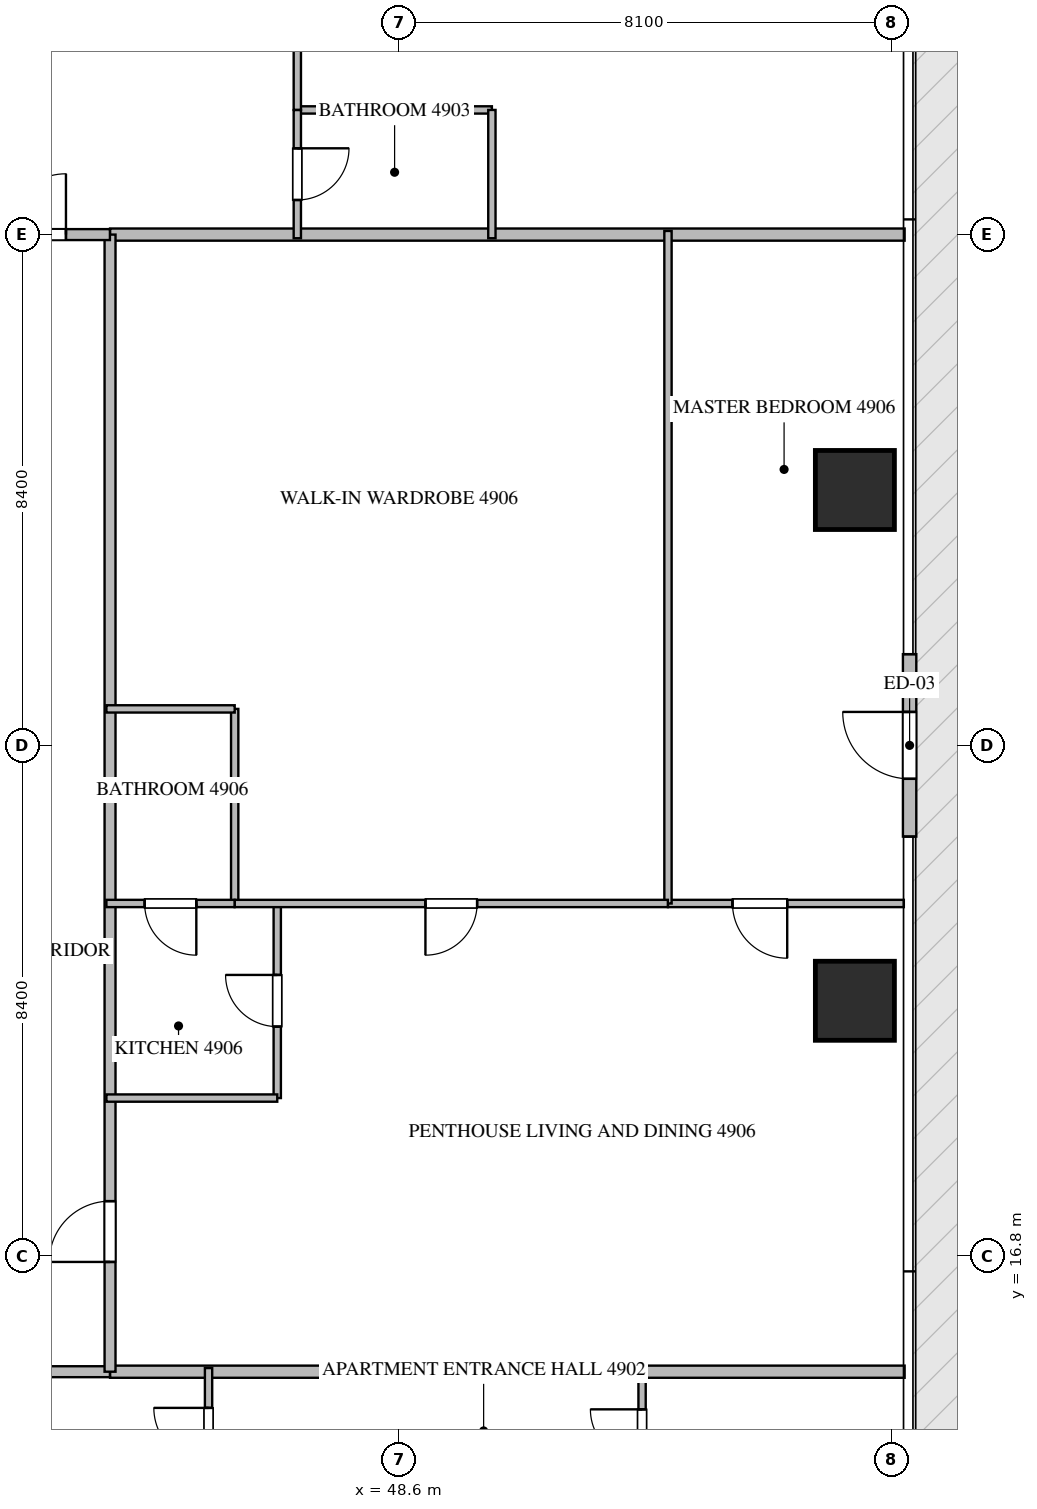
"""IFC4 building model, lengths in metres.
Left out: names, types, materials, properties, quantities, classifications, styles, units other than length and angle.
Written with IfcOpenShell. Run it as: python <this file> out.ifc"""

import sys

from ifc_helpers import new_model, si_unit, direction, frame, frame_2d, origin, origin_2d, place, context, subcontext, project, spatial, rectangle, extrude, source, transform, mapped, element, fill, save


model = new_model("IFC4")
c1 = context("Model", 3, precision=1e-05, world=origin(), true_north=direction((0.0, 1.0)))
c2 = subcontext(c1, "Body", "Model", "MODEL_VIEW")
j1 = project(units=[si_unit("LENGTHUNIT", "METRE"), si_unit("PLANEANGLEUNIT", "RADIAN")], contexts=[c1])
p1 = place(None, origin())
s1 = spatial("IfcSite", under=j1, at=p1, CompositionType="ELEMENT")
p2 = place(p1, origin())
s2 = spatial("IfcBuilding", under=s1, at=p2, CompositionType="ELEMENT")
p3 = place(p2, frame((0.0, 0.0, 195.15)))
s3 = spatial("IfcBuildingStorey", under=s2, at=p3, CompositionType="ELEMENT", Elevation=195.15)
m1 = source(origin(), c2, "Body", "SweptSolid", [
    extrude(rectangle(XDim=1.3, YDim=1.3, at=origin_2d()), origin(), (0.0, 0.0, 1.0), 3.57),
])
for number, where, z_axis, x_axis in (
    (1, (56.1, 21.0, -0.26), (0.0, 0.0, 1.0), (1.0, 0.0, 0.0)),
    (2, (56.1, 29.4, -0.26), (0.0, 0.0, 1.0), (1.0, 0.0, 0.0)),
):
    element("IfcColumn", number, at=place(p3, frame(where, z_axis=z_axis, x_axis=x_axis)), inside=s3, PredefinedType="COLUMN", context=c2, shape_type="MappedRepresentation", body=[
        mapped(m1, transform((0.0, 0.0, 0.0), scale=1.0)),
    ])
p4 = place(p3, frame((57.0, 23.7, 0.0), z_axis=(0.0, 0.0, 1.0), x_axis=(0.0, 1.0, 0.0)))
e3 = element("IfcWall", 3, at=p4, inside=s3, PredefinedType="ELEMENTEDWALL", context=c2, shape_type="SweptSolid", body=[
    extrude(rectangle(XDim=3.0, YDim=0.22, at=frame_2d((1.5, 0.0))), origin(), (0.0, 0.0, 1.0), 3.295),
])
p5 = place(p4, frame((0.95, 0.0, 0.0)))
e4 = element("IfcOpeningElement", 4, at=p5, cuts=e3, PredefinedType="OPENING", context=c2, shape_type="SweptSolid", body=[
    extrude(rectangle(XDim=1.1, YDim=2.2, at=frame_2d((0.55, 1.1))), frame((0.0, 0.12, 0.0), z_axis=(0.0, -1.0, 0.0), x_axis=(1.0, 0.0, 0.0)), (0.0, 0.0, 1.0), 0.24),
])
for number, where, z_axis, x_axis in (
    (5, (43.85, 14.9, 0.0), (0.0, 0.0, 1.0), (1.0, 0.0, 0.0)),
    (6, (43.85, 33.6, 0.0), (0.0, 0.0, 1.0), (1.0, 0.0, 0.0)),
):
    element("IfcWall", number, at=place(p3, frame(where, z_axis=z_axis, x_axis=x_axis)), inside=s3, PredefinedType="PARTITIONING", context=c2, shape_type="SweptSolid", body=[
        extrude(rectangle(XDim=13.068, YDim=0.2, at=frame_2d((6.534, 0.0))), origin(), (0.0, 0.0, 1.0), 3.31),
    ])
p6 = place(p3, frame((20.952, 14.9, 0.0), z_axis=(0.0, 0.0, 1.0), x_axis=(1.0, 0.0, 0.0)))
e7 = element("IfcWall", 7, at=p6, inside=s3, PredefinedType="PARTITIONING", context=c2, shape_type="SweptSolid", body=[
    extrude(rectangle(XDim=22.896, YDim=0.18, at=frame_2d((11.448, 0.0))), origin(), (0.0, 0.0, 1.0), 2.145),
])
p7 = place(p6, frame((14.231, 0.0, 0.0)))
e8 = element("IfcOpeningElement", 8, at=p7, cuts=e7, PredefinedType="OPENING", context=c2, shape_type="SweptSolid", body=[
    extrude(rectangle(XDim=0.9, YDim=2.1, at=frame_2d((0.45, 1.05))), frame((0.0, 0.1, 0.0), z_axis=(0.0, -1.0, 0.0), x_axis=(1.0, 0.0, 0.0)), (0.0, 0.0, 1.0), 0.2),
])
p8 = place(p6, frame((19.203, 0.0, 0.0)))
e9 = element("IfcOpeningElement", 9, at=p8, cuts=e7, PredefinedType="OPENING", context=c2, shape_type="SweptSolid", body=[
    extrude(rectangle(XDim=0.9, YDim=2.1, at=frame_2d((0.45, 1.05))), frame((0.0, 0.1, 0.0), z_axis=(0.0, -1.0, 0.0), x_axis=(1.0, 0.0, 0.0)), (0.0, 0.0, 1.0), 0.2),
])
p9 = place(p3, frame((43.85, 14.9, 0.0), z_axis=(0.0, 0.0, 1.0), x_axis=(0.0, 1.0, 0.0)))
e10 = element("IfcWall", 10, at=p9, inside=s3, PredefinedType="PARTITIONING", context=c2, shape_type="SweptSolid", body=[
    extrude(rectangle(XDim=18.7, YDim=0.18, at=frame_2d((9.35, 0.0))), origin(), (0.0, 0.0, 1.0), 3.31),
])
p10 = place(p9, frame((1.805, 0.0, 0.0)))
e11 = element("IfcOpeningElement", 11, at=p10, cuts=e10, PredefinedType="OPENING", context=c2, shape_type="SweptSolid", body=[
    extrude(rectangle(XDim=1.0, YDim=2.15, at=frame_2d((0.5, 1.075))), frame((0.0, 0.1, 0.0), z_axis=(0.0, -1.0, 0.0), x_axis=(1.0, 0.0, 0.0)), (0.0, 0.0, 1.0), 0.2),
])
p11 = place(p3, frame((41.402, 33.6, 0.0), z_axis=(0.0, 0.0, 1.0), x_axis=(1.0, 0.0, 0.0)))
e12 = element("IfcWall", 12, at=p11, inside=s3, PredefinedType="PARTITIONING", context=c2, shape_type="SweptSolid", body=[
    extrude(rectangle(XDim=2.446, YDim=0.18, at=frame_2d((1.223, 0.0))), origin(), (0.0, 0.0, 1.0), 3.31),
])
p12 = place(p11, frame((0.723, 0.0, 0.0)))
e13 = element("IfcOpeningElement", 13, at=p12, cuts=e12, PredefinedType="OPENING", context=c2, shape_type="SweptSolid", body=[
    extrude(rectangle(XDim=1.0, YDim=2.15, at=frame_2d((0.5, 1.075))), frame((0.0, 0.1, 0.0), z_axis=(0.0, -1.0, 0.0), x_axis=(1.0, 0.0, 0.0)), (0.0, 0.0, 1.0), 0.2),
])
p13 = place(p3, frame((45.47, 12.75, 0.0), z_axis=(0.0, 0.0, 1.0), x_axis=(0.0, 1.0, 0.0)))
e14 = element("IfcWall", 14, at=p13, inside=s3, PredefinedType="PARTITIONING", context=c2, shape_type="SweptSolid", body=[
    extrude(rectangle(XDim=2.21, YDim=0.12, at=frame_2d((1.105, 0.0))), origin(), (0.0, 0.0, 1.0), 3.31),
])
p14 = place(p13, frame((0.655, 0.0, 0.0)))
e15 = element("IfcOpeningElement", 15, at=p14, cuts=e14, PredefinedType="OPENING", context=c2, shape_type="SweptSolid", body=[
    extrude(rectangle(XDim=0.9, YDim=2.1, at=frame_2d((0.45, 1.05))), frame((0.0, 0.07, 0.0), z_axis=(0.0, -1.0, 0.0), x_axis=(1.0, 0.0, 0.0)), (0.0, 0.0, 1.0), 0.14),
])
p15 = place(p3, frame((52.6, 12.752, 0.0), z_axis=(0.0, 0.0, 1.0), x_axis=(0.0, 1.0, 0.0)))
e16 = element("IfcWall", 16, at=p15, inside=s3, PredefinedType="PARTITIONING", context=c2, shape_type="SweptSolid", body=[
    extrude(rectangle(XDim=2.208, YDim=0.12, at=frame_2d((1.104, 0.0))), origin(), (0.0, 0.0, 1.0), 3.31),
])
p16 = place(p15, frame((0.679, 0.0, 0.0)))
e17 = element("IfcOpeningElement", 17, at=p16, cuts=e16, PredefinedType="OPENING", context=c2, shape_type="SweptSolid", body=[
    extrude(rectangle(XDim=0.85, YDim=2.1, at=frame_2d((0.425, 1.05))), frame((0.0, 0.07, 0.0), z_axis=(0.0, -1.0, 0.0), x_axis=(1.0, 0.0, 0.0)), (0.0, 0.0, 1.0), 0.14),
])
p17 = place(p3, frame((46.93, 35.65, 0.0), z_axis=(0.0, 0.0, 1.0), x_axis=(1.0, 0.0, 0.0)))
e18 = element("IfcWall", 18, at=p17, inside=s3, PredefinedType="PARTITIONING", context=c2, shape_type="SweptSolid", body=[
    extrude(rectangle(XDim=3.2, YDim=0.12, at=frame_2d((1.6, 0.0))), origin(), (0.0, 0.0, 1.0), 3.31),
])
p18 = place(p3, frame((50.13, 35.65, 0.0), z_axis=(0.0, 0.0, 1.0), x_axis=(0.0, -1.0, 0.0)))
e19 = element("IfcWall", 19, at=p18, inside=s3, PredefinedType="PARTITIONING", context=c2, shape_type="SweptSolid", body=[
    extrude(rectangle(XDim=2.11, YDim=0.12, at=frame_2d((1.055, 0.0))), origin(), (0.0, 0.0, 1.0), 3.31),
])
p19 = place(p3, frame((46.93, 41.073, 0.0), z_axis=(0.0, 0.0, 1.0), x_axis=(0.0, -1.0, 0.0)))
e20 = element("IfcWall", 20, at=p19, inside=s3, PredefinedType="PARTITIONING", context=c2, shape_type="SweptSolid", body=[
    extrude(rectangle(XDim=5.423, YDim=0.12, at=frame_2d((2.711, 0.0))), origin(), (0.0, 0.0, 1.0), 3.31),
])
p20 = place(p19, frame((2.287, 0.0, 0.0)))
e21 = element("IfcOpeningElement", 21, at=p20, cuts=e20, PredefinedType="OPENING", context=c2, shape_type="SweptSolid", body=[
    extrude(rectangle(XDim=0.85, YDim=2.1, at=frame_2d((0.425, 1.05))), frame((0.0, 0.07, 0.0), z_axis=(0.0, -1.0, 0.0), x_axis=(1.0, 0.0, 0.0)), (0.0, 0.0, 1.0), 0.14),
])
p21 = place(p3, frame((46.93, 35.648, 0.0), z_axis=(0.0, 0.0, 1.0), x_axis=(0.0, -1.0, 0.0)))
e22 = element("IfcWall", 22, at=p21, inside=s3, PredefinedType="PARTITIONING", context=c2, shape_type="SweptSolid", body=[
    extrude(rectangle(XDim=2.108, YDim=0.12, at=frame_2d((1.054, 0.0))), origin(), (0.0, 0.0, 1.0), 3.31),
])
p22 = place(p21, frame((0.629, 0.0, 0.0)))
e23 = element("IfcOpeningElement", 23, at=p22, cuts=e22, PredefinedType="OPENING", context=c2, shape_type="SweptSolid", body=[
    extrude(rectangle(XDim=0.85, YDim=2.1, at=frame_2d((0.425, 1.05))), frame((0.0, 0.07, 0.0), z_axis=(0.0, -1.0, 0.0), x_axis=(1.0, 0.0, 0.0)), (0.0, 0.0, 1.0), 0.14),
])
p23 = place(p3, frame((46.6, 19.4, 0.0), z_axis=(0.0, 0.0, 1.0), x_axis=(0.0, 1.0, 0.0)))
e24 = element("IfcWall", 24, at=p23, inside=s3, PredefinedType="PARTITIONING", context=c2, shape_type="SweptSolid", body=[
    extrude(rectangle(XDim=3.2, YDim=0.12, at=frame_2d((1.6, 0.0))), origin(), (0.0, 0.0, 1.0), 3.31),
])
p24 = place(p23, frame((1.175, 0.0, 0.0)))
e25 = element("IfcOpeningElement", 25, at=p24, cuts=e24, PredefinedType="OPENING", context=c2, shape_type="SweptSolid", body=[
    extrude(rectangle(XDim=0.85, YDim=2.1, at=frame_2d((0.425, 1.05))), frame((0.0, 0.07, 0.0), z_axis=(0.0, -1.0, 0.0), x_axis=(1.0, 0.0, 0.0)), (0.0, 0.0, 1.0), 0.14),
])
p25 = place(p3, frame((46.6, 19.4, 0.0), z_axis=(0.0, 0.0, 1.0), x_axis=(-1.0, 0.0, 0.0)))
e26 = element("IfcWall", 26, at=p25, inside=s3, PredefinedType="PARTITIONING", context=c2, shape_type="SweptSolid", body=[
    extrude(rectangle(XDim=2.81, YDim=0.12, at=frame_2d((1.405, 0.0))), origin(), (0.0, 0.0, 1.0), 3.31),
])
p26 = place(p3, frame((56.905, 22.6, 0.0), z_axis=(0.0, 0.0, 1.0), x_axis=(-1.0, 0.0, 0.0)))
e27 = element("IfcWall", 27, at=p26, inside=s3, PredefinedType="PARTITIONING", context=c2, shape_type="SweptSolid", body=[
    extrude(rectangle(XDim=3.879, YDim=0.12, at=frame_2d((1.939, 0.0))), origin(), (0.0, 0.0, 1.0), 3.31),
])
p27 = place(p26, frame((1.918, 0.0, 0.0)))
e28 = element("IfcOpeningElement", 28, at=p27, cuts=e27, PredefinedType="OPENING", context=c2, shape_type="SweptSolid", body=[
    extrude(rectangle(XDim=0.9, YDim=2.1, at=frame_2d((0.45, 1.05))), frame((0.0, 0.07, 0.0), z_axis=(0.0, -1.0, 0.0), x_axis=(1.0, 0.0, 0.0)), (0.0, 0.0, 1.0), 0.14),
])
p28 = place(p3, frame((53.026, 22.6, 0.0), z_axis=(0.0, 0.0, 1.0), x_axis=(0.0, 1.0, 0.0)))
e29 = element("IfcWall", 29, at=p28, inside=s3, PredefinedType="PARTITIONING", context=c2, shape_type="SweptSolid", body=[
    extrude(rectangle(XDim=11.06, YDim=0.12, at=frame_2d((5.53, 0.0))), origin(), (0.0, 0.0, 1.0), 3.31),
])
p29 = place(p3, frame((45.9, 22.6, 0.0), z_axis=(0.0, 0.0, 1.0), x_axis=(0.0, 1.0, 0.0)))
e30 = element("IfcWall", 30, at=p29, inside=s3, PredefinedType="PARTITIONING", context=c2, shape_type="SweptSolid", body=[
    extrude(rectangle(XDim=3.2, YDim=0.12, at=frame_2d((1.6, 0.0))), origin(), (0.0, 0.0, 1.0), 3.31),
])
p30 = place(p3, frame((45.9, 25.8, 0.0), z_axis=(0.0, 0.0, 1.0), x_axis=(-1.0, 0.0, 0.0)))
e31 = element("IfcWall", 31, at=p30, inside=s3, PredefinedType="PARTITIONING", context=c2, shape_type="SweptSolid", body=[
    extrude(rectangle(XDim=2.11, YDim=0.12, at=frame_2d((1.055, 0.0))), origin(), (0.0, 0.0, 1.0), 3.31),
])
p31 = place(p3, frame((53.024, 22.6, 0.0), z_axis=(0.0, 0.0, 1.0), x_axis=(-1.0, 0.0, 0.0)))
e32 = element("IfcWall", 32, at=p31, inside=s3, PredefinedType="PARTITIONING", context=c2, shape_type="SweptSolid", body=[
    extrude(rectangle(XDim=7.124, YDim=0.12, at=frame_2d((3.562, 0.0))), origin(), (0.0, 0.0, 1.0), 3.31),
])
p32 = place(p31, frame((3.137, 0.0, 0.0)))
e33 = element("IfcOpeningElement", 33, at=p32, cuts=e32, PredefinedType="OPENING", context=c2, shape_type="SweptSolid", body=[
    extrude(rectangle(XDim=0.85, YDim=2.1, at=frame_2d((0.425, 1.05))), frame((0.0, 0.07, 0.0), z_axis=(0.0, -1.0, 0.0), x_axis=(1.0, 0.0, 0.0)), (0.0, 0.0, 1.0), 0.14),
])
p33 = place(p3, frame((45.898, 22.6, 0.0), z_axis=(0.0, 0.0, 1.0), x_axis=(-1.0, 0.0, 0.0)))
e34 = element("IfcWall", 34, at=p33, inside=s3, PredefinedType="PARTITIONING", context=c2, shape_type="SweptSolid", body=[
    extrude(rectangle(XDim=2.108, YDim=0.12, at=frame_2d((1.054, 0.0))), origin(), (0.0, 0.0, 1.0), 3.31),
])
p34 = place(p33, frame((0.629, 0.0, 0.0)))
e35 = element("IfcOpeningElement", 35, at=p34, cuts=e34, PredefinedType="OPENING", context=c2, shape_type="SweptSolid", body=[
    extrude(rectangle(XDim=0.85, YDim=2.1, at=frame_2d((0.425, 1.05))), frame((0.0, 0.07, 0.0), z_axis=(0.0, -1.0, 0.0), x_axis=(1.0, 0.0, 0.0)), (0.0, 0.0, 1.0), 0.14),
])
m2 = source(origin(), c2, "Body", "SweptSolid", [
    extrude(rectangle(XDim=1.1, YDim=2.2, at=frame_2d((0.55, 1.1))), frame((0.0, 0.025, 0.0), z_axis=(0.0, -1.0, 0.0), x_axis=(1.0, 0.0, 0.0)), (0.0, 0.0, 1.0), 0.05),
])
p35 = place(p5, origin())
e36 = element("IfcDoor", 36, at=p35, inside=s3, OperationType="SINGLE_SWING_RIGHT", PredefinedType="DOOR", context=c2, shape_type="MappedRepresentation", body=[
    mapped(m2, transform((0.0, 0.0, 0.0), scale=1.0)),
])
fill(e4, e36)
m3 = source(origin(), c2, "Body", "SweptSolid", [
    extrude(rectangle(XDim=1.0, YDim=2.15, at=frame_2d((0.5, 1.075))), frame((0.0, 0.025, 0.0), z_axis=(0.0, -1.0, 0.0), x_axis=(1.0, 0.0, 0.0)), (0.0, 0.0, 1.0), 0.05),
])
p36 = place(p10, origin())
e37 = element("IfcDoor", 37, at=p36, inside=s3, OperationType="SINGLE_SWING_LEFT", PredefinedType="DOOR", context=c2, shape_type="MappedRepresentation", body=[
    mapped(m3, transform((0.0, 0.0, 0.0), scale=1.0)),
])
fill(e11, e37)
p37 = place(p12, origin())
e38 = element("IfcDoor", 38, at=p37, inside=s3, OperationType="SINGLE_SWING_RIGHT", PredefinedType="DOOR", context=c2, shape_type="MappedRepresentation", body=[
    mapped(m3, transform((0.0, 0.0, 0.0), scale=1.0)),
])
fill(e13, e38)
m4 = source(origin(), c2, "Body", "SweptSolid", [
    extrude(rectangle(XDim=0.9, YDim=2.1, at=frame_2d((0.45, 1.05))), frame((0.0, 0.025, 0.0), z_axis=(0.0, -1.0, 0.0), x_axis=(1.0, 0.0, 0.0)), (0.0, 0.0, 1.0), 0.05),
])
p38 = place(p14, origin())
e39 = element("IfcDoor", 39, at=p38, inside=s3, OperationType="SINGLE_SWING_RIGHT", PredefinedType="DOOR", context=c2, shape_type="MappedRepresentation", body=[
    mapped(m4, transform((0.0, 0.0, 0.0), scale=1.0)),
])
fill(e15, e39)
m5 = source(origin(), c2, "Body", "SweptSolid", [
    extrude(rectangle(XDim=0.85, YDim=2.1, at=frame_2d((0.425, 1.05))), frame((0.0, 0.025, 0.0), z_axis=(0.0, -1.0, 0.0), x_axis=(1.0, 0.0, 0.0)), (0.0, 0.0, 1.0), 0.05),
])
p39 = place(p16, origin())
e40 = element("IfcDoor", 40, at=p39, inside=s3, OperationType="SINGLE_SWING_RIGHT", PredefinedType="DOOR", context=c2, shape_type="MappedRepresentation", body=[
    mapped(m5, transform((0.0, 0.0, 0.0), scale=1.0)),
])
fill(e17, e40)
p40 = place(p22, origin())
e41 = element("IfcDoor", 41, at=p40, inside=s3, OperationType="SINGLE_SWING_LEFT", PredefinedType="DOOR", context=c2, shape_type="MappedRepresentation", body=[
    mapped(m5, transform((0.0, 0.0, 0.0), scale=1.0)),
])
fill(e23, e41)
p41 = place(p24, origin())
e42 = element("IfcDoor", 42, at=p41, inside=s3, OperationType="SINGLE_SWING_RIGHT", PredefinedType="DOOR", context=c2, shape_type="MappedRepresentation", body=[
    mapped(m5, transform((0.0, 0.0, 0.0), scale=1.0)),
])
fill(e25, e42)
p42 = place(p27, origin())
e43 = element("IfcDoor", 43, at=p42, inside=s3, OperationType="SINGLE_SWING_LEFT", PredefinedType="DOOR", context=c2, shape_type="MappedRepresentation", body=[
    mapped(m4, transform((0.0, 0.0, 0.0), scale=1.0)),
])
fill(e28, e43)
p43 = place(p32, origin())
e44 = element("IfcDoor", 44, at=p43, inside=s3, OperationType="SINGLE_SWING_RIGHT", PredefinedType="DOOR", context=c2, shape_type="MappedRepresentation", body=[
    mapped(m5, transform((0.0, 0.0, 0.0), scale=1.0)),
])
fill(e33, e44)
p44 = place(p34, origin())
e45 = element("IfcDoor", 45, at=p44, inside=s3, OperationType="SINGLE_SWING_LEFT", PredefinedType="DOOR", context=c2, shape_type="MappedRepresentation", body=[
    mapped(m5, transform((0.0, 0.0, 0.0), scale=1.0)),
])
fill(e35, e45)
save(model, sys.argv[1])
